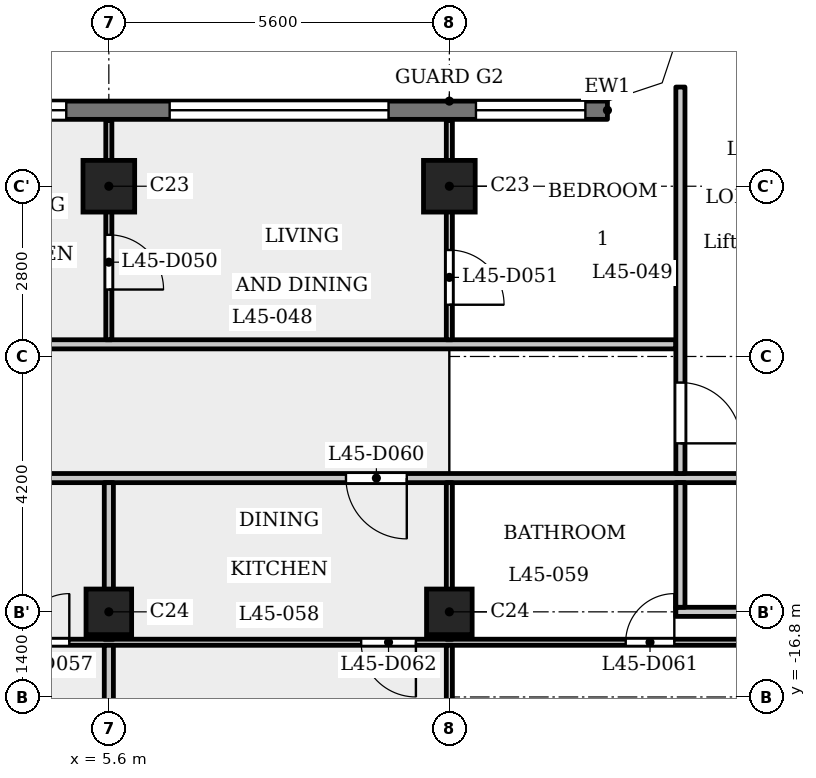
"""IFC4 building model, lengths in metres.
Left out: names, types, materials, properties, quantities, classifications, styles, units other than length and angle.
Written with IfcOpenShell. Run it as: python <this file> out.ifc"""

import sys

from ifc_helpers import new_model, si_unit, direction, frame, frame_2d, origin, origin_2d, place, context, subcontext, project, spatial, polyline, rectangle, outline, extrude, element, fill, save


model = new_model("IFC4")
c1 = context("Model", 3, precision=1e-05, world=origin(), true_north=direction((0.0, 1.0)))
c2 = subcontext(c1, "Body", "Model", "MODEL_VIEW")
j1 = project(units=[si_unit("LENGTHUNIT", "METRE"), si_unit("PLANEANGLEUNIT", "RADIAN")], contexts=[c1])
p1 = place(None, origin())
s1 = spatial("IfcSite", under=j1, at=p1, CompositionType="ELEMENT")
p2 = place(p1, origin())
s2 = spatial("IfcBuilding", under=s1, at=p2, CompositionType="ELEMENT")
p3 = place(p2, frame((0.0, 0.0, 174.6)))
s3 = spatial("IfcBuildingStorey", under=s2, at=p3, CompositionType="ELEMENT", Elevation=174.6)
for number, where, z_axis, x_axis in (
    (1, (5.6, -8.4, 0.0), (0.0, 0.0, 1.0), (1.0, 0.0, 0.0)),
    (2, (11.2, -8.4, 0.0), (0.0, 0.0, 1.0), (1.0, 0.0, 0.0)),
):
    element("IfcColumn", number, at=place(p3, frame(where, z_axis=z_axis, x_axis=x_axis)), inside=s3, PredefinedType="COLUMN", context=c2, shape_type="SweptSolid", body=[
        extrude(rectangle(XDim=0.85, YDim=0.85, at=origin_2d()), origin(), (0.0, 0.0, 1.0), 3.5),
    ])
for number, where, z_axis, x_axis in (
    (3, (5.6, -15.4, 0.0), (0.0, 0.0, 1.0), (1.0, 0.0, 0.0)),
    (4, (11.2, -15.4, 0.0), (0.0, 0.0, 1.0), (1.0, 0.0, 0.0)),
):
    element("IfcColumn", number, at=place(p3, frame(where, z_axis=z_axis, x_axis=x_axis)), inside=s3, PredefinedType="COLUMN", context=c2, shape_type="SweptSolid", body=[
        extrude(rectangle(XDim=0.75, YDim=0.75, at=origin_2d()), origin(), (0.0, 0.0, 1.0), 3.5),
    ])
p4 = place(p3, frame((13.8, -7.15, 0.0), z_axis=(0.0, 0.0, 1.0), x_axis=(-1.0, 0.0, 0.0)))
e5 = element("IfcWall", 5, at=p4, inside=s3, PredefinedType="SOLIDWALL", context=c2, shape_type="SweptSolid", body=[
    extrude(rectangle(XDim=27.6, YDim=0.3, at=frame_2d((13.8, 0.0))), origin(), (0.0, 0.0, 1.0), 3.15),
])
p5 = place(p4, frame((0.363, 0.0, 0.9)))
e6 = element("IfcOpeningElement", 6, at=p5, cuts=e5, PredefinedType="OPENING", context=c2, shape_type="SweptSolid", body=[
    extrude(rectangle(XDim=1.8, YDim=1.25, at=frame_2d((0.9, 0.625))), frame((0.0, 0.16, 0.0), z_axis=(0.0, -1.0, 0.0), x_axis=(1.0, 0.0, 0.0)), (0.0, 0.0, 1.0), 0.32),
])
p6 = place(p4, frame((3.6, 0.0, 1.2)))
e7 = element("IfcOpeningElement", 7, at=p6, cuts=e5, PredefinedType="OPENING", context=c2, shape_type="SweptSolid", body=[
    extrude(rectangle(XDim=3.6, YDim=0.95, at=frame_2d((1.8, 0.475))), frame((0.0, 0.16, 0.0), z_axis=(0.0, -1.0, 0.0), x_axis=(1.0, 0.0, 0.0)), (0.0, 0.0, 1.0), 0.32),
])
p7 = place(p4, frame((8.9, 0.0, 0.9)))
e8 = element("IfcOpeningElement", 8, at=p7, cuts=e5, PredefinedType="OPENING", context=c2, shape_type="SweptSolid", body=[
    extrude(rectangle(XDim=1.8, YDim=1.25, at=frame_2d((0.9, 0.625))), frame((0.0, 0.16, 0.0), z_axis=(0.0, -1.0, 0.0), x_axis=(1.0, 0.0, 0.0)), (0.0, 0.0, 1.0), 0.32),
])
p8 = place(p4, frame((12.0, 0.0, 0.6)))
e9 = element("IfcOpeningElement", 9, at=p8, cuts=e5, PredefinedType="OPENING", context=c2, shape_type="SweptSolid", body=[
    extrude(rectangle(XDim=1.2, YDim=1.55, at=frame_2d((0.6, 0.775))), frame((0.0, 0.16, 0.0), z_axis=(0.0, -1.0, 0.0), x_axis=(1.0, 0.0, 0.0)), (0.0, 0.0, 1.0), 0.32),
])
p9 = place(p4, frame((14.4, 0.0, 0.6)))
e10 = element("IfcOpeningElement", 10, at=p9, cuts=e5, PredefinedType="OPENING", context=c2, shape_type="SweptSolid", body=[
    extrude(rectangle(XDim=1.2, YDim=1.55, at=frame_2d((0.6, 0.775))), frame((0.0, 0.16, 0.0), z_axis=(0.0, -1.0, 0.0), x_axis=(1.0, 0.0, 0.0)), (0.0, 0.0, 1.0), 0.32),
])
p10 = place(p4, frame((16.9, 0.0, 0.9)))
e11 = element("IfcOpeningElement", 11, at=p10, cuts=e5, PredefinedType="OPENING", context=c2, shape_type="SweptSolid", body=[
    extrude(rectangle(XDim=1.8, YDim=1.25, at=frame_2d((0.9, 0.625))), frame((0.0, 0.16, 0.0), z_axis=(0.0, -1.0, 0.0), x_axis=(1.0, 0.0, 0.0)), (0.0, 0.0, 1.0), 0.32),
])
p11 = place(p4, frame((20.4, 0.0, 1.2)))
e12 = element("IfcOpeningElement", 12, at=p11, cuts=e5, PredefinedType="OPENING", context=c2, shape_type="SweptSolid", body=[
    extrude(rectangle(XDim=3.6, YDim=0.95, at=frame_2d((1.8, 0.475))), frame((0.0, 0.16, 0.0), z_axis=(0.0, -1.0, 0.0), x_axis=(1.0, 0.0, 0.0)), (0.0, 0.0, 1.0), 0.32),
])
p12 = place(p4, frame((25.438, 0.0, 0.9)))
e13 = element("IfcOpeningElement", 13, at=p12, cuts=e5, PredefinedType="OPENING", context=c2, shape_type="SweptSolid", body=[
    extrude(rectangle(XDim=1.8, YDim=1.25, at=frame_2d((0.9, 0.625))), frame((0.0, 0.16, 0.0), z_axis=(0.0, -1.0, 0.0), x_axis=(1.0, 0.0, 0.0)), (0.0, 0.0, 1.0), 0.32),
])
p13 = place(p3, frame((-16.725, -15.9, 0.0), z_axis=(0.0, 0.0, 1.0), x_axis=(1.0, 0.0, 0.0)))
e14 = element("IfcWall", 14, at=p13, inside=s3, PredefinedType="PARTITIONING", context=c2, shape_type="SweptSolid", body=[
    extrude(rectangle(XDim=33.45, YDim=0.1, at=frame_2d((16.725, 0.0))), origin(), (0.0, 0.0, 1.0), 3.15),
])
p14 = place(p13, frame((9.675, 0.0, 0.0)))
e15 = element("IfcOpeningElement", 15, at=p14, cuts=e14, PredefinedType="OPENING", context=c2, shape_type="SweptSolid", body=[
    extrude(rectangle(XDim=0.8, YDim=2.1, at=frame_2d((0.4, 1.05))), frame((0.0, 0.06, 0.0), z_axis=(0.0, -1.0, 0.0), x_axis=(1.0, 0.0, 0.0)), (0.0, 0.0, 1.0), 0.12),
])
p15 = place(p13, frame((4.075, 0.0, 0.0)))
e16 = element("IfcOpeningElement", 16, at=p15, cuts=e14, PredefinedType="OPENING", context=c2, shape_type="SweptSolid", body=[
    extrude(rectangle(XDim=0.9, YDim=2.1, at=frame_2d((0.45, 1.05))), frame((0.0, 0.06, 0.0), z_axis=(0.0, -1.0, 0.0), x_axis=(1.0, 0.0, 0.0)), (0.0, 0.0, 1.0), 0.12),
])
p16 = place(p13, frame((20.875, 0.0, 0.0)))
e17 = element("IfcOpeningElement", 17, at=p16, cuts=e14, PredefinedType="OPENING", context=c2, shape_type="SweptSolid", body=[
    extrude(rectangle(XDim=0.8, YDim=2.1, at=frame_2d((0.4, 1.05))), frame((0.0, 0.06, 0.0), z_axis=(0.0, -1.0, 0.0), x_axis=(1.0, 0.0, 0.0)), (0.0, 0.0, 1.0), 0.12),
])
p17 = place(p13, frame((15.275, 0.0, 0.0)))
e18 = element("IfcOpeningElement", 18, at=p17, cuts=e14, PredefinedType="OPENING", context=c2, shape_type="SweptSolid", body=[
    extrude(rectangle(XDim=0.9, YDim=2.1, at=frame_2d((0.45, 1.05))), frame((0.0, 0.06, 0.0), z_axis=(0.0, -1.0, 0.0), x_axis=(1.0, 0.0, 0.0)), (0.0, 0.0, 1.0), 0.12),
])
p18 = place(p13, frame((30.825, 0.0, 0.0)))
e19 = element("IfcOpeningElement", 19, at=p18, cuts=e14, PredefinedType="OPENING", context=c2, shape_type="SweptSolid", body=[
    extrude(rectangle(XDim=0.8, YDim=2.1, at=frame_2d((0.4, 1.05))), frame((0.0, 0.06, 0.0), z_axis=(0.0, -1.0, 0.0), x_axis=(1.0, 0.0, 0.0)), (0.0, 0.0, 1.0), 0.12),
])
p19 = place(p13, frame((26.475, 0.0, 0.0)))
e20 = element("IfcOpeningElement", 20, at=p19, cuts=e14, PredefinedType="OPENING", context=c2, shape_type="SweptSolid", body=[
    extrude(rectangle(XDim=0.9, YDim=2.1, at=frame_2d((0.45, 1.05))), frame((0.0, 0.06, 0.0), z_axis=(0.0, -1.0, 0.0), x_axis=(1.0, 0.0, 0.0)), (0.0, 0.0, 1.0), 0.12),
])
p20 = place(p3, frame((14.925, -15.4, 0.0), z_axis=(0.0, 0.0, 1.0), x_axis=(1.0, 0.0, 0.0)))
e21 = element("IfcWall", 21, at=p20, inside=s3, PredefinedType="PARTITIONING", context=c2, shape_type="SweptSolid", body=[
    extrude(rectangle(XDim=12.559, YDim=0.15, at=frame_2d((6.279, 0.0))), origin(), (0.0, 0.0, 1.0), 3.15),
])
p21 = place(p20, frame((5.775, 0.0, 0.0)))
e22 = element("IfcOpeningElement", 22, at=p21, cuts=e21, PredefinedType="OPENING", context=c2, shape_type="SweptSolid", body=[
    extrude(rectangle(XDim=1.0, YDim=2.1, at=frame_2d((0.5, 1.05))), frame((0.0, 0.085, 0.0), z_axis=(0.0, -1.0, 0.0), x_axis=(1.0, 0.0, 0.0)), (0.0, 0.0, 1.0), 0.17),
])
p22 = place(p3, frame((-17.4, -13.2, 0.0), z_axis=(0.0, 0.0, 1.0), x_axis=(1.0, 0.0, 0.0)))
e23 = element("IfcWall", 23, at=p22, inside=s3, PredefinedType="PARTITIONING", context=c2, shape_type="SweptSolid", body=[
    extrude(rectangle(XDim=34.8, YDim=0.15, at=frame_2d((17.4, 0.0))), origin(), (0.0, 0.0, 1.0), 3.15),
])
p23 = place(p22, frame((0.15, 0.0, 0.0)))
e24 = element("IfcOpeningElement", 24, at=p23, cuts=e23, PredefinedType="OPENING", context=c2, shape_type="SweptSolid", body=[
    extrude(rectangle(XDim=1.0, YDim=2.1, at=frame_2d((0.5, 1.05))), frame((0.0, 0.085, 0.0), z_axis=(0.0, -1.0, 0.0), x_axis=(1.0, 0.0, 0.0)), (0.0, 0.0, 1.0), 0.17),
])
p24 = place(p22, frame((33.55, 0.0, 0.0)))
e25 = element("IfcOpeningElement", 25, at=p24, cuts=e23, PredefinedType="OPENING", context=c2, shape_type="SweptSolid", body=[
    extrude(rectangle(XDim=1.0, YDim=2.1, at=frame_2d((0.5, 1.05))), frame((0.0, 0.085, 0.0), z_axis=(0.0, -1.0, 0.0), x_axis=(1.0, 0.0, 0.0)), (0.0, 0.0, 1.0), 0.17),
])
p25 = place(p22, frame((15.7, 0.0, 0.0)))
e26 = element("IfcOpeningElement", 26, at=p25, cuts=e23, PredefinedType="OPENING", context=c2, shape_type="SweptSolid", body=[
    extrude(rectangle(XDim=1.0, YDim=2.1, at=frame_2d((0.5, 1.05))), frame((0.0, 0.085, 0.0), z_axis=(0.0, -1.0, 0.0), x_axis=(1.0, 0.0, 0.0)), (0.0, 0.0, 1.0), 0.17),
])
p26 = place(p22, frame((26.9, 0.0, 0.0)))
e27 = element("IfcOpeningElement", 27, at=p26, cuts=e23, PredefinedType="OPENING", context=c2, shape_type="SweptSolid", body=[
    extrude(rectangle(XDim=1.0, YDim=2.1, at=frame_2d((0.5, 1.05))), frame((0.0, 0.085, 0.0), z_axis=(0.0, -1.0, 0.0), x_axis=(1.0, 0.0, 0.0)), (0.0, 0.0, 1.0), 0.17),
])
p27 = place(p3, frame((-14.925, -11.0, 0.0), z_axis=(0.0, 0.0, 1.0), x_axis=(1.0, 0.0, 0.0)))
e28 = element("IfcWall", 28, at=p27, inside=s3, PredefinedType="PARTITIONING", context=c2, shape_type="SweptSolid", body=[
    extrude(rectangle(XDim=29.85, YDim=0.15, at=frame_2d((14.925, 0.0))), origin(), (0.0, 0.0, 1.0), 3.15),
])
p28 = place(p27, frame((9.875, 0.0, 0.0)))
e29 = element("IfcOpeningElement", 29, at=p28, cuts=e28, PredefinedType="OPENING", context=c2, shape_type="SweptSolid", body=[
    extrude(rectangle(XDim=1.0, YDim=2.1, at=frame_2d((0.5, 1.05))), frame((0.0, 0.085, 0.0), z_axis=(0.0, -1.0, 0.0), x_axis=(1.0, 0.0, 0.0)), (0.0, 0.0, 1.0), 0.17),
])
p29 = place(p27, frame((17.875, 0.0, 0.0)))
e30 = element("IfcOpeningElement", 30, at=p29, cuts=e28, PredefinedType="OPENING", context=c2, shape_type="SweptSolid", body=[
    extrude(rectangle(XDim=1.0, YDim=2.1, at=frame_2d((0.5, 1.05))), frame((0.0, 0.085, 0.0), z_axis=(0.0, -1.0, 0.0), x_axis=(1.0, 0.0, 0.0)), (0.0, 0.0, 1.0), 0.17),
])
p30 = place(p3, frame((5.6, -10.925, 0.0), z_axis=(0.0, 0.0, 1.0), x_axis=(0.0, 1.0, 0.0)))
e31 = element("IfcWall", 31, at=p30, inside=s3, PredefinedType="PARTITIONING", context=c2, shape_type="SweptSolid", body=[
    extrude(rectangle(XDim=3.605, YDim=0.1, at=frame_2d((1.802, 0.0))), origin(), (0.0, 0.0, 1.0), 3.15),
])
p31 = place(p30, frame((0.826, 0.0, 0.0)))
e32 = element("IfcOpeningElement", 32, at=p31, cuts=e31, PredefinedType="OPENING", context=c2, shape_type="SweptSolid", body=[
    extrude(rectangle(XDim=0.9, YDim=2.1, at=frame_2d((0.45, 1.05))), frame((0.0, 0.06, 0.0), z_axis=(0.0, -1.0, 0.0), x_axis=(1.0, 0.0, 0.0)), (0.0, 0.0, 1.0), 0.12),
])
p32 = place(p3, frame((5.6, -22.88, 0.0), z_axis=(0.0, 0.0, 1.0), x_axis=(0.0, 1.0, 0.0)))
e33 = element("IfcWall", 33, at=p32, inside=s3, PredefinedType="PARTITIONING", context=c2, shape_type="SweptSolid", body=[
    extrude(rectangle(XDim=6.93, YDim=0.15, at=frame_2d((3.465, 0.0))), origin(), (0.0, 0.0, 1.0), 3.15),
])
p33 = place(p3, frame((5.6, -15.85, 0.0), z_axis=(0.0, 0.0, 1.0), x_axis=(0.0, 1.0, 0.0)))
e34 = element("IfcWall", 34, at=p33, inside=s3, PredefinedType="PARTITIONING", context=c2, shape_type="SweptSolid", body=[
    extrude(rectangle(XDim=2.575, YDim=0.15, at=frame_2d((1.288, 0.0))), origin(), (0.0, 0.0, 1.0), 3.15),
])
p34 = place(p3, frame((11.2, -22.88, 0.0), z_axis=(0.0, 0.0, 1.0), x_axis=(0.0, 1.0, 0.0)))
e35 = element("IfcWall", 35, at=p34, inside=s3, PredefinedType="PARTITIONING", context=c2, shape_type="SweptSolid", body=[
    extrude(rectangle(XDim=6.93, YDim=0.1, at=frame_2d((3.465, 0.0))), origin(), (0.0, 0.0, 1.0), 3.15),
])
p35 = place(p34, frame((1.22, 0.0, 0.0)))
e36 = element("IfcOpeningElement", 36, at=p35, cuts=e35, PredefinedType="OPENING", context=c2, shape_type="SweptSolid", body=[
    extrude(rectangle(XDim=0.9, YDim=2.1, at=frame_2d((0.45, 1.05))), frame((0.0, 0.06, 0.0), z_axis=(0.0, -1.0, 0.0), x_axis=(1.0, 0.0, 0.0)), (0.0, 0.0, 1.0), 0.12),
])
p36 = place(p3, frame((11.2, -15.85, 0.0), z_axis=(0.0, 0.0, 1.0), x_axis=(0.0, 1.0, 0.0)))
e37 = element("IfcWall", 37, at=p36, inside=s3, PredefinedType="PARTITIONING", context=c2, shape_type="SweptSolid", body=[
    extrude(rectangle(XDim=2.575, YDim=0.1, at=frame_2d((1.288, 0.0))), origin(), (0.0, 0.0, 1.0), 3.15),
])
p37 = place(p3, frame((11.2, -10.925, 0.0), z_axis=(0.0, 0.0, 1.0), x_axis=(0.0, 1.0, 0.0)))
e38 = element("IfcWall", 38, at=p37, inside=s3, PredefinedType="PARTITIONING", context=c2, shape_type="SweptSolid", body=[
    extrude(rectangle(XDim=3.605, YDim=0.1, at=frame_2d((1.802, 0.0))), origin(), (0.0, 0.0, 1.0), 3.15),
])
p38 = place(p37, frame((0.576, 0.0, 0.0)))
e39 = element("IfcOpeningElement", 39, at=p38, cuts=e38, PredefinedType="OPENING", context=c2, shape_type="SweptSolid", body=[
    extrude(rectangle(XDim=0.9, YDim=2.1, at=frame_2d((0.45, 1.05))), frame((0.0, 0.06, 0.0), z_axis=(0.0, -1.0, 0.0), x_axis=(1.0, 0.0, 0.0)), (0.0, 0.0, 1.0), 0.12),
])
p39 = place(p3, frame((15.0, -15.325, 0.0), z_axis=(0.0, 0.0, 1.0), x_axis=(0.0, 1.0, 0.0)))
e40 = element("IfcWall", 40, at=p39, inside=s3, PredefinedType="PARTITIONING", context=c2, shape_type="SweptSolid", body=[
    extrude(rectangle(XDim=2.05, YDim=0.15, at=frame_2d((1.025, 0.0))), origin(), (0.0, 0.0, 1.0), 3.15),
])
p40 = place(p3, frame((15.0, -13.125, 0.0), z_axis=(0.0, 0.0, 1.0), x_axis=(0.0, 1.0, 0.0)))
e41 = element("IfcWall", 41, at=p40, inside=s3, PredefinedType="PARTITIONING", context=c2, shape_type="SweptSolid", body=[
    extrude(rectangle(XDim=6.356, YDim=0.15, at=frame_2d((3.178, 0.0))), origin(), (0.0, 0.0, 1.0), 3.15),
])
p41 = place(p40, frame((0.496, 0.0, 0.0)))
e42 = element("IfcOpeningElement", 42, at=p41, cuts=e41, PredefinedType="OPENING", context=c2, shape_type="SweptSolid", body=[
    extrude(rectangle(XDim=1.0, YDim=2.1, at=frame_2d((0.5, 1.05))), frame((0.0, 0.085, 0.0), z_axis=(0.0, -1.0, 0.0), x_axis=(1.0, 0.0, 0.0)), (0.0, 0.0, 1.0), 0.17),
])
p42 = place(p3, origin())
e43 = element("IfcWall", 43, at=p42, inside=s3, PredefinedType="SOLIDWALL", context=c2, shape_type="SweptSolid", body=[
    extrude(outline(polyline([(14.937, -6.937), (15.3, -5.849), (15.3, -5.8), (15.0, -5.8), (14.7, -6.7), (13.8, -7.0), (13.8, -7.3), (13.849, -7.3), (14.937, -6.937)])), origin(), (0.0, 0.0, 1.0), 3.15),
])
p43 = place(p41, origin())
e44 = element("IfcDoor", 44, at=p43, inside=s3, OperationType="SINGLE_SWING_LEFT", PredefinedType="DOOR", context=c2, shape_type="SweptSolid", body=[
    extrude(rectangle(XDim=1.0, YDim=2.1, at=frame_2d((0.5, 1.05))), frame((0.0, 0.025, 0.0), z_axis=(0.0, -1.0, 0.0), x_axis=(1.0, 0.0, 0.0)), (0.0, 0.0, 1.0), 0.05),
])
fill(e42, e44)
p44 = place(p31, origin())
e45 = element("IfcDoor", 45, at=p44, inside=s3, OperationType="SINGLE_SWING_LEFT", PredefinedType="DOOR", context=c2, shape_type="SweptSolid", body=[
    extrude(rectangle(XDim=0.9, YDim=2.1, at=frame_2d((0.45, 1.05))), frame((0.0, 0.025, 0.0), z_axis=(0.0, -1.0, 0.0), x_axis=(1.0, 0.0, 0.0)), (0.0, 0.0, 1.0), 0.05),
])
fill(e32, e45)
p45 = place(p38, origin())
e46 = element("IfcDoor", 46, at=p45, inside=s3, OperationType="SINGLE_SWING_LEFT", PredefinedType="DOOR", context=c2, shape_type="SweptSolid", body=[
    extrude(rectangle(XDim=0.9, YDim=2.1, at=frame_2d((0.45, 1.05))), frame((0.0, 0.025, 0.0), z_axis=(0.0, -1.0, 0.0), x_axis=(1.0, 0.0, 0.0)), (0.0, 0.0, 1.0), 0.05),
])
fill(e39, e46)
p46 = place(p16, origin())
e47 = element("IfcDoor", 47, at=p46, inside=s3, OperationType="SINGLE_SWING_LEFT", PredefinedType="DOOR", context=c2, shape_type="SweptSolid", body=[
    extrude(rectangle(XDim=0.8, YDim=2.1, at=frame_2d((0.4, 1.05))), frame((0.0, 0.025, 0.0), z_axis=(0.0, -1.0, 0.0), x_axis=(1.0, 0.0, 0.0)), (0.0, 0.0, 1.0), 0.05),
])
fill(e17, e47)
p47 = place(p26, origin())
e48 = element("IfcDoor", 48, at=p47, inside=s3, OperationType="SINGLE_SWING_RIGHT", PredefinedType="DOOR", context=c2, shape_type="SweptSolid", body=[
    extrude(rectangle(XDim=1.0, YDim=2.1, at=frame_2d((0.5, 1.05))), frame((0.0, 0.025, 0.0), z_axis=(0.0, -1.0, 0.0), x_axis=(1.0, 0.0, 0.0)), (0.0, 0.0, 1.0), 0.05),
])
fill(e27, e48)
p48 = place(p18, origin())
e49 = element("IfcDoor", 49, at=p48, inside=s3, OperationType="SINGLE_SWING_LEFT", PredefinedType="DOOR", context=c2, shape_type="SweptSolid", body=[
    extrude(rectangle(XDim=0.8, YDim=2.1, at=frame_2d((0.4, 1.05))), frame((0.0, 0.025, 0.0), z_axis=(0.0, -1.0, 0.0), x_axis=(1.0, 0.0, 0.0)), (0.0, 0.0, 1.0), 0.05),
])
fill(e19, e49)
p49 = place(p19, origin())
e50 = element("IfcDoor", 50, at=p49, inside=s3, OperationType="SINGLE_SWING_RIGHT", PredefinedType="DOOR", context=c2, shape_type="SweptSolid", body=[
    extrude(rectangle(XDim=0.9, YDim=2.1, at=frame_2d((0.45, 1.05))), frame((0.0, 0.025, 0.0), z_axis=(0.0, -1.0, 0.0), x_axis=(1.0, 0.0, 0.0)), (0.0, 0.0, 1.0), 0.05),
])
fill(e20, e50)
p50 = place(p5, origin())
e51 = element("IfcWindow", 51, at=p50, inside=s3, PartitioningType="SINGLE_PANEL", PredefinedType="WINDOW", context=c2, shape_type="SweptSolid", body=[
    extrude(rectangle(XDim=1.8, YDim=1.25, at=frame_2d((0.9, 0.625))), frame((0.0, 0.03, 0.0), z_axis=(0.0, -1.0, 0.0), x_axis=(1.0, 0.0, 0.0)), (0.0, 0.0, 1.0), 0.06),
])
fill(e6, e51)
p51 = place(p6, origin())
e52 = element("IfcWindow", 52, at=p51, inside=s3, PartitioningType="SINGLE_PANEL", PredefinedType="WINDOW", context=c2, shape_type="SweptSolid", body=[
    extrude(rectangle(XDim=3.6, YDim=0.95, at=frame_2d((1.8, 0.475))), frame((0.0, 0.03, 0.0), z_axis=(0.0, -1.0, 0.0), x_axis=(1.0, 0.0, 0.0)), (0.0, 0.0, 1.0), 0.06),
])
fill(e7, e52)
p52 = place(p7, origin())
e53 = element("IfcWindow", 53, at=p52, inside=s3, PartitioningType="SINGLE_PANEL", PredefinedType="WINDOW", context=c2, shape_type="SweptSolid", body=[
    extrude(rectangle(XDim=1.8, YDim=1.25, at=frame_2d((0.9, 0.625))), frame((0.0, 0.03, 0.0), z_axis=(0.0, -1.0, 0.0), x_axis=(1.0, 0.0, 0.0)), (0.0, 0.0, 1.0), 0.06),
])
fill(e8, e53)
save(model, sys.argv[1])
